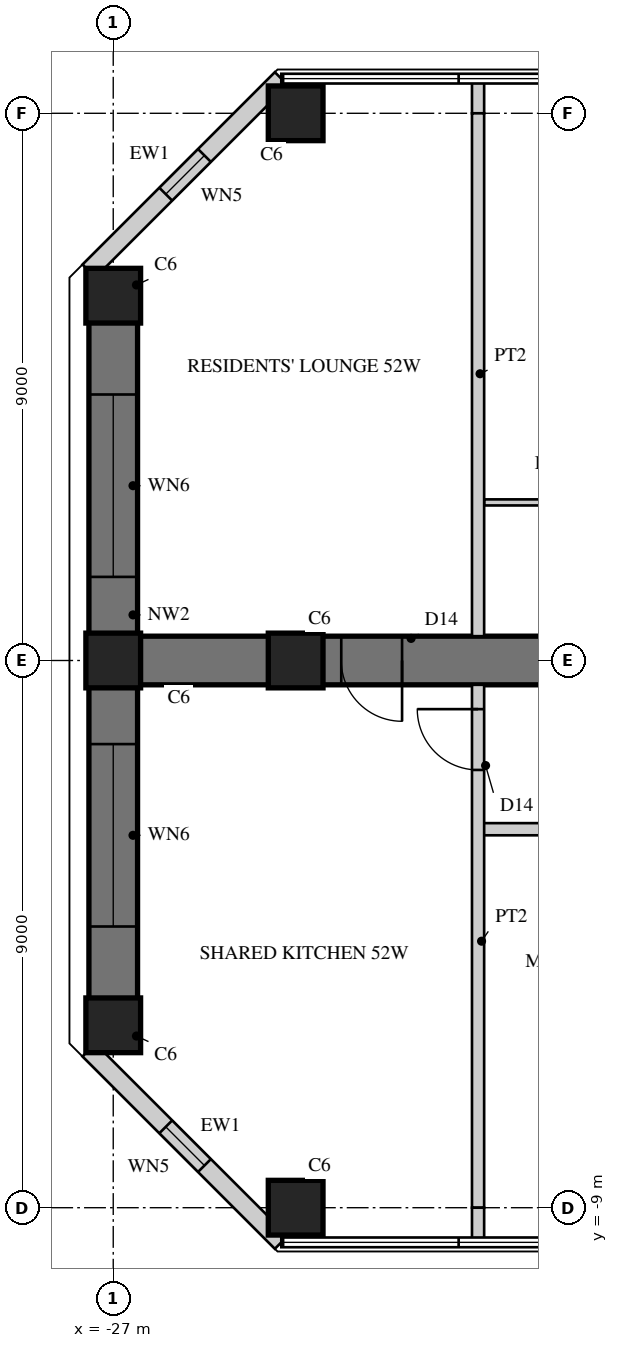
"""IFC4 building model, lengths in metres.
Left out: names, types, materials, properties, quantities, classifications, styles, units other than length and angle.
Written with IfcOpenShell. Run it as: python <this file> out.ifc"""

import sys

from ifc_helpers import new_model, si_unit, direction, frame, frame_2d, origin, origin_2d, place, context, subcontext, project, spatial, rectangle, hollow_rectangle, extrude, element, fill, save


model = new_model("IFC4")
c1 = context("Model", 3, precision=1e-05, world=origin(), true_north=direction((0.0, 1.0)))
c2 = subcontext(c1, "Body", "Model", "MODEL_VIEW")
j1 = project(units=[si_unit("LENGTHUNIT", "METRE"), si_unit("PLANEANGLEUNIT", "RADIAN")], contexts=[c1])
p1 = place(None, origin())
s1 = spatial("IfcSite", under=j1, at=p1, CompositionType="ELEMENT")
p2 = place(p1, origin())
s2 = spatial("IfcBuilding", under=s1, at=p2, CompositionType="ELEMENT")
p3 = place(p2, frame((0.0, 0.0, 206.9)))
s3 = spatial("IfcBuildingStorey", under=s2, at=p3, CompositionType="ELEMENT", Elevation=206.9)
p4 = place(p3, frame((-9.0, 0.0, 0.0), z_axis=(0.0, 0.0, 1.0), x_axis=(-1.0, 0.0, 0.0)))
e1 = element("IfcWall", 1, at=p4, inside=s3, PredefinedType="SHEAR", context=c2, shape_type="SweptSolid", body=[
    extrude(rectangle(XDim=18.0, YDim=0.8, at=frame_2d((9.0, 0.0))), origin(), (0.0, 0.0, 1.0), 3.4),
])
p5 = place(p4, frame((3.95, 0.0, 0.0)))
e2 = element("IfcOpeningElement", 2, at=p5, cuts=e1, PredefinedType="OPENING", context=c2, shape_type="SweptSolid", body=[
    extrude(rectangle(XDim=1.0, YDim=2.15, at=frame_2d((0.5, 1.075))), frame((0.0, 0.41, 0.0), z_axis=(0.0, -1.0, 0.0), x_axis=(1.0, 0.0, 0.0)), (0.0, 0.0, 1.0), 0.82),
])
p6 = place(p4, frame((6.6, 0.0, 0.0)))
e3 = element("IfcOpeningElement", 3, at=p6, cuts=e1, PredefinedType="OPENING", context=c2, shape_type="SweptSolid", body=[
    extrude(rectangle(XDim=1.0, YDim=2.15, at=frame_2d((0.5, 1.075))), frame((0.0, 0.41, 0.0), z_axis=(0.0, -1.0, 0.0), x_axis=(1.0, 0.0, 0.0)), (0.0, 0.0, 1.0), 0.82),
])
p7 = place(p4, frame((13.25, 0.0, 0.0)))
e4 = element("IfcOpeningElement", 4, at=p7, cuts=e1, PredefinedType="OPENING", context=c2, shape_type="SweptSolid", body=[
    extrude(rectangle(XDim=1.0, YDim=2.2, at=frame_2d((0.5, 1.1))), frame((0.0, 0.41, 0.0), z_axis=(0.0, -1.0, 0.0), x_axis=(1.0, 0.0, 0.0)), (0.0, 0.0, 1.0), 0.82),
])
p8 = place(p3, frame((-27.0, 6.0, 0.0), z_axis=(0.0, 0.0, 1.0), x_axis=(0.0, -1.0, 0.0)))
e5 = element("IfcWall", 5, at=p8, inside=s3, PredefinedType="SHEAR", context=c2, shape_type="SweptSolid", body=[
    extrude(rectangle(XDim=12.0, YDim=0.8, at=frame_2d((6.0, 0.0))), origin(), (0.0, 0.0, 1.0), 3.4),
])
p9 = place(p8, frame((1.625, 0.0, 0.6)))
e6 = element("IfcOpeningElement", 6, at=p9, cuts=e5, PredefinedType="OPENING", context=c2, shape_type="SweptSolid", body=[
    extrude(rectangle(XDim=3.0, YDim=2.4, at=frame_2d((1.5, 1.2))), frame((0.0, 0.41, 0.0), z_axis=(0.0, -1.0, 0.0), x_axis=(1.0, 0.0, 0.0)), (0.0, 0.0, 1.0), 0.82),
])
p10 = place(p8, frame((7.375, 0.0, 0.6)))
e7 = element("IfcOpeningElement", 7, at=p10, cuts=e5, PredefinedType="OPENING", context=c2, shape_type="SweptSolid", body=[
    extrude(rectangle(XDim=3.0, YDim=2.4, at=frame_2d((1.5, 1.2))), frame((0.0, 0.41, 0.0), z_axis=(0.0, -1.0, 0.0), x_axis=(1.0, 0.0, 0.0)), (0.0, 0.0, 1.0), 0.82),
])
for number, where, z_axis, x_axis in (
    (8, (-24.0, 9.0, 0.0), (0.0, 0.0, 1.0), (1.0, 0.0, 0.0)),
    (9, (-24.0, -9.0, 0.0), (0.0, 0.0, 1.0), (1.0, 0.0, 0.0)),
    (10, (-27.0, 6.0, 0.0), (0.0, 0.0, 1.0), (1.0, 0.0, 0.0)),
    (11, (-27.0, 0.0, 0.0), (0.0, 0.0, 1.0), (1.0, 0.0, 0.0)),
    (12, (-27.0, -6.0, 0.0), (0.0, 0.0, 1.0), (1.0, 0.0, 0.0)),
    (13, (-24.0, 0.0, 0.0), (0.0, 0.0, 1.0), (1.0, 0.0, 0.0)),
):
    element("IfcColumn", number, at=place(p3, frame(where, z_axis=z_axis, x_axis=x_axis)), inside=s3, PredefinedType="COLUMN", context=c2, shape_type="SweptSolid", body=[
        extrude(rectangle(XDim=0.9, YDim=0.9, at=origin_2d()), origin(), (0.0, 0.0, 1.0), 3.4),
    ])
p11 = place(p3, frame((-24.236, 9.57, 0.0), z_axis=(0.0, 0.0, 1.0), x_axis=(-0.707079499254, -0.707134062067, 0.0)))
e14 = element("IfcWall", 14, at=p11, inside=s3, PredefinedType="SOLIDWALL", context=c2, shape_type="SweptSolid", body=[
    extrude(rectangle(XDim=4.475, YDim=0.3, at=frame_2d((2.237, 0.0))), origin(), (0.0, 0.0, 1.0), 3.22),
])
p12 = place(p11, frame((1.787, 0.0, 0.3)))
e15 = element("IfcOpeningElement", 15, at=p12, cuts=e14, PredefinedType="OPENING", context=c2, shape_type="SweptSolid", body=[
    extrude(rectangle(XDim=0.9, YDim=2.4, at=frame_2d((0.45, 1.2))), frame((0.0, 0.16, 0.0), z_axis=(0.0, -1.0, 0.0), x_axis=(1.0, 0.0, 0.0)), (0.0, 0.0, 1.0), 0.32),
])
p13 = place(p3, frame((-27.4, -6.406, 0.0), z_axis=(0.0, 0.0, 1.0), x_axis=(0.707079499254, -0.707134062067, 0.0)))
e16 = element("IfcWall", 16, at=p13, inside=s3, PredefinedType="SOLIDWALL", context=c2, shape_type="SweptSolid", body=[
    extrude(rectangle(XDim=4.475, YDim=0.3, at=frame_2d((2.237, 0.0))), origin(), (0.0, 0.0, 1.0), 3.22),
])
p14 = place(p13, frame((1.787, 0.0, 0.3)))
e17 = element("IfcOpeningElement", 17, at=p14, cuts=e16, PredefinedType="OPENING", context=c2, shape_type="SweptSolid", body=[
    extrude(rectangle(XDim=0.9, YDim=2.4, at=frame_2d((0.45, 1.2))), frame((0.0, 0.16, 0.0), z_axis=(0.0, -1.0, 0.0), x_axis=(1.0, 0.0, 0.0)), (0.0, 0.0, 1.0), 0.32),
])
p15 = place(p3, frame((-18.45, 2.6, 0.0), z_axis=(0.0, 0.0, 1.0), x_axis=(-1.0, 0.0, 0.0)))
e18 = element("IfcWall", 18, at=p15, inside=s3, PredefinedType="PARTITIONING", context=c2, shape_type="SweptSolid", body=[
    extrude(rectangle(XDim=2.45, YDim=0.1, at=frame_2d((1.225, 0.0))), origin(), (0.0, 0.0, 1.0), 3.22),
])
p16 = place(p3, frame((-9.55, -2.775, 0.0), z_axis=(0.0, 0.0, 1.0), x_axis=(-1.0, 0.0, 0.0)))
e19 = element("IfcWall", 19, at=p16, inside=s3, PredefinedType="SOLIDWALL", context=c2, shape_type="SweptSolid", body=[
    extrude(rectangle(XDim=11.45, YDim=0.2, at=frame_2d((5.725, 0.0))), origin(), (0.0, 0.0, 1.0), 3.22),
])
p17 = place(p16, frame((3.4, 0.0, 0.0)))
e20 = element("IfcOpeningElement", 20, at=p17, cuts=e19, PredefinedType="OPENING", context=c2, shape_type="SweptSolid", body=[
    extrude(rectangle(XDim=1.0, YDim=2.15, at=frame_2d((0.5, 1.075))), frame((0.0, 0.11, 0.0), z_axis=(0.0, -1.0, 0.0), x_axis=(1.0, 0.0, 0.0)), (0.0, 0.0, 1.0), 0.22),
])
p18 = place(p16, frame((6.65, 0.0, 0.0)))
e21 = element("IfcOpeningElement", 21, at=p18, cuts=e19, PredefinedType="OPENING", context=c2, shape_type="SweptSolid", body=[
    extrude(rectangle(XDim=1.0, YDim=2.2, at=frame_2d((0.5, 1.1))), frame((0.0, 0.11, 0.0), z_axis=(0.0, -1.0, 0.0), x_axis=(1.0, 0.0, 0.0)), (0.0, 0.0, 1.0), 0.22),
])
p19 = place(p3, frame((-21.0, 9.53, 0.0), z_axis=(0.0, 0.0, 1.0), x_axis=(0.0, -1.0, 0.0)))
e22 = element("IfcWall", 22, at=p19, inside=s3, PredefinedType="SOLIDWALL", context=c2, shape_type="SweptSolid", body=[
    extrude(rectangle(XDim=0.53, YDim=0.2, at=frame_2d((0.265, 0.0))), origin(), (0.0, 0.0, 1.0), 3.22),
])
p20 = place(p3, frame((-21.0, 9.0, 0.0), z_axis=(0.0, 0.0, 1.0), x_axis=(0.0, -1.0, 0.0)))
e23 = element("IfcWall", 23, at=p20, inside=s3, PredefinedType="SOLIDWALL", context=c2, shape_type="SweptSolid", body=[
    extrude(rectangle(XDim=8.6, YDim=0.2, at=frame_2d((4.3, 0.0))), origin(), (0.0, 0.0, 1.0), 2.62),
])
p21 = place(p3, frame((-21.0, -0.4, 0.0), z_axis=(0.0, 0.0, 1.0), x_axis=(0.0, -1.0, 0.0)))
e24 = element("IfcWall", 24, at=p21, inside=s3, PredefinedType="SOLIDWALL", context=c2, shape_type="SweptSolid", body=[
    extrude(rectangle(XDim=8.6, YDim=0.2, at=frame_2d((4.3, 0.0))), origin(), (0.0, 0.0, 1.0), 2.62),
])
p22 = place(p21, frame((0.4, 0.0, 0.0)))
e25 = element("IfcOpeningElement", 25, at=p22, cuts=e24, PredefinedType="OPENING", context=c2, shape_type="SweptSolid", body=[
    extrude(rectangle(XDim=1.0, YDim=2.2, at=frame_2d((0.5, 1.1))), frame((0.0, 0.11, 0.0), z_axis=(0.0, -1.0, 0.0), x_axis=(1.0, 0.0, 0.0)), (0.0, 0.0, 1.0), 0.22),
])
p23 = place(p3, frame((-21.0, -9.0, 0.0), z_axis=(0.0, 0.0, 1.0), x_axis=(0.0, -1.0, 0.0)))
e26 = element("IfcWall", 26, at=p23, inside=s3, PredefinedType="SOLIDWALL", context=c2, shape_type="SweptSolid", body=[
    extrude(rectangle(XDim=0.53, YDim=0.2, at=frame_2d((0.265, 0.0))), origin(), (0.0, 0.0, 1.0), 3.22),
])
p24 = place(p12, origin())
e27 = element("IfcWindow", 27, at=p24, inside=s3, PartitioningType="SINGLE_PANEL", PredefinedType="WINDOW", context=c2, shape_type="SweptSolid", body=[
    extrude(hollow_rectangle(XDim=0.9, YDim=2.4, WallThickness=0.06, at=frame_2d((0.45, 1.2))), frame((0.0, 0.03, 0.0), z_axis=(0.0, -1.0, 0.0), x_axis=(1.0, 0.0, 0.0)), (0.0, 0.0, 1.0), 0.06),
    extrude(rectangle(XDim=0.779, YDim=2.279, at=frame_2d((0.45, 1.2))), frame((0.0, 0.03, 0.0), z_axis=(0.0, -1.0, 0.0), x_axis=(1.0, 0.0, 0.0)), (0.0, 0.0, 1.0), 0.06),
])
fill(e15, e27)
p25 = place(p9, origin())
e28 = element("IfcWindow", 28, at=p25, inside=s3, PartitioningType="SINGLE_PANEL", PredefinedType="WINDOW", context=c2, shape_type="SweptSolid", body=[
    extrude(hollow_rectangle(XDim=3.0, YDim=2.4, WallThickness=0.06, at=frame_2d((1.5, 1.2))), frame((0.0, 0.03, 0.0), z_axis=(0.0, -1.0, 0.0), x_axis=(1.0, 0.0, 0.0)), (0.0, 0.0, 1.0), 0.06),
    extrude(rectangle(XDim=2.879, YDim=2.279, at=frame_2d((1.5, 1.2))), frame((0.0, 0.03, 0.0), z_axis=(0.0, -1.0, 0.0), x_axis=(1.0, 0.0, 0.0)), (0.0, 0.0, 1.0), 0.06),
])
fill(e6, e28)
p26 = place(p10, origin())
e29 = element("IfcWindow", 29, at=p26, inside=s3, PartitioningType="SINGLE_PANEL", PredefinedType="WINDOW", context=c2, shape_type="SweptSolid", body=[
    extrude(hollow_rectangle(XDim=3.0, YDim=2.4, WallThickness=0.06, at=frame_2d((1.5, 1.2))), frame((0.0, 0.03, 0.0), z_axis=(0.0, -1.0, 0.0), x_axis=(1.0, 0.0, 0.0)), (0.0, 0.0, 1.0), 0.06),
    extrude(rectangle(XDim=2.879, YDim=2.279, at=frame_2d((1.5, 1.2))), frame((0.0, 0.03, 0.0), z_axis=(0.0, -1.0, 0.0), x_axis=(1.0, 0.0, 0.0)), (0.0, 0.0, 1.0), 0.06),
])
fill(e7, e29)
p27 = place(p14, origin())
e30 = element("IfcWindow", 30, at=p27, inside=s3, PartitioningType="SINGLE_PANEL", PredefinedType="WINDOW", context=c2, shape_type="SweptSolid", body=[
    extrude(hollow_rectangle(XDim=0.9, YDim=2.4, WallThickness=0.06, at=frame_2d((0.45, 1.2))), frame((0.0, 0.03, 0.0), z_axis=(0.0, -1.0, 0.0), x_axis=(1.0, 0.0, 0.0)), (0.0, 0.0, 1.0), 0.06),
    extrude(rectangle(XDim=0.779, YDim=2.279, at=frame_2d((0.45, 1.2))), frame((0.0, 0.03, 0.0), z_axis=(0.0, -1.0, 0.0), x_axis=(1.0, 0.0, 0.0)), (0.0, 0.0, 1.0), 0.06),
])
fill(e17, e30)
p28 = place(p22, frame((1.0, 0.0, 0.0), z_axis=(0.0, 0.0, 1.0), x_axis=(-1.0, 0.0, 0.0)))
e31 = element("IfcDoor", 31, at=p28, inside=s3, OperationType="SINGLE_SWING_RIGHT", PredefinedType="DOOR", context=c2, shape_type="SweptSolid", body=[
    extrude(rectangle(XDim=1.0, YDim=2.2, at=frame_2d((0.5, 1.1))), frame((0.0, 0.025, 0.0), z_axis=(0.0, -1.0, 0.0), x_axis=(1.0, 0.0, 0.0)), (0.0, 0.0, 1.0), 0.05),
])
fill(e25, e31)
p29 = place(p7, origin())
e32 = element("IfcDoor", 32, at=p29, inside=s3, OperationType="SINGLE_SWING_LEFT", PredefinedType="DOOR", context=c2, shape_type="SweptSolid", body=[
    extrude(rectangle(XDim=1.0, YDim=2.2, at=frame_2d((0.5, 1.1))), frame((0.0, 0.025, 0.0), z_axis=(0.0, -1.0, 0.0), x_axis=(1.0, 0.0, 0.0)), (0.0, 0.0, 1.0), 0.05),
])
fill(e4, e32)
save(model, sys.argv[1])
